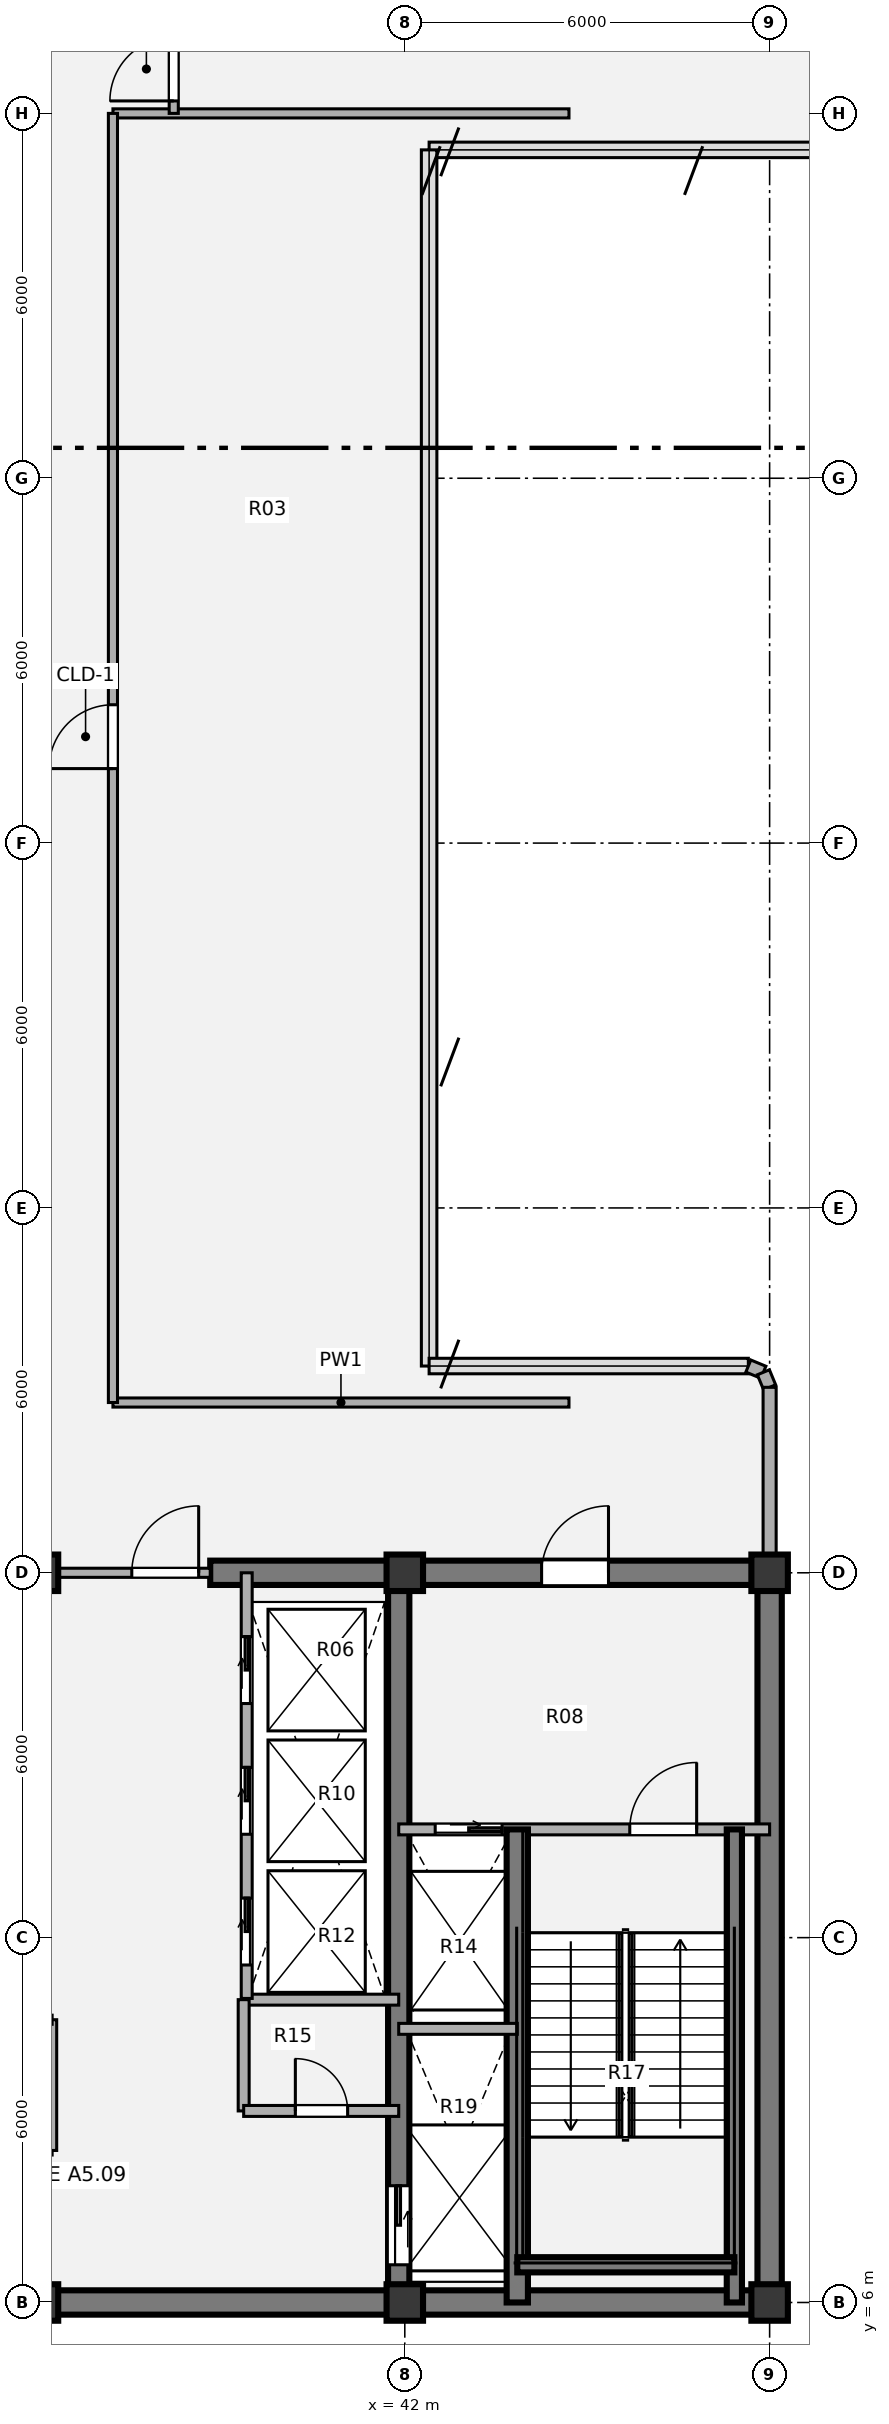
"""IFC4 building model, lengths in metres.
Left out: names, types, materials, properties, quantities, classifications, styles, units other than length and angle.
Written with IfcOpenShell. Run it as: python <this file> out.ifc"""

import sys

from ifc_helpers import new_model, si_unit, direction, frame, frame_2d, origin, origin_2d, place, context, subcontext, project, spatial, rectangle, extrude, source, transform, mapped, element, fill, save


model = new_model("IFC4")
c1 = context("Model", 3, precision=1e-05, world=origin(), true_north=direction((0.0, 1.0)))
c2 = subcontext(c1, "Body", "Model", "MODEL_VIEW")
j1 = project(units=[si_unit("LENGTHUNIT", "METRE"), si_unit("PLANEANGLEUNIT", "RADIAN")], contexts=[c1])
p1 = place(None, origin())
s1 = spatial("IfcSite", under=j1, at=p1, CompositionType="ELEMENT")
p2 = place(p1, origin())
s2 = spatial("IfcBuilding", under=s1, at=p2, CompositionType="ELEMENT")
p3 = place(p2, frame((0.0, 0.0, 291.06)))
s3 = spatial("IfcBuildingStorey", under=s2, at=p3, CompositionType="ELEMENT", Elevation=291.06)
m1 = source(origin(), c2, "Body", "SweptSolid", [
    extrude(rectangle(XDim=0.6, YDim=0.6, at=origin_2d()), origin(), (0.0, 0.0, 1.0), 4.86),
])
for number, where, z_axis, x_axis in (
    (1, (36.0, 6.0, 0.0), (0.0, 0.0, 1.0), (1.0, 0.0, 0.0)),
    (2, (42.0, 6.0, 0.0), (0.0, 0.0, 1.0), (1.0, 0.0, 0.0)),
    (3, (48.0, 6.0, 0.0), (0.0, 0.0, 1.0), (1.0, 0.0, 0.0)),
    (4, (36.0, 18.0, 0.0), (0.0, 0.0, 1.0), (1.0, 0.0, 0.0)),
    (5, (42.0, 18.0, 0.0), (0.0, 0.0, 1.0), (1.0, 0.0, 0.0)),
    (6, (48.0, 18.0, 0.0), (0.0, 0.0, 1.0), (1.0, 0.0, 0.0)),
):
    element("IfcColumn", number, at=place(p3, frame(where, z_axis=z_axis, x_axis=x_axis)), inside=s3, PredefinedType="COLUMN", context=c2, shape_type="MappedRepresentation", body=[
        mapped(m1, transform((0.0, 0.0, 0.0), x_axis=(1.0, 0.0, 0.0), y_axis=(0.0, 1.0, 0.0), z_axis=(0.0, 0.0, 1.0), scale=1.0)),
    ])
p4 = place(p3, frame((48.2, 6.0, 0.0), z_axis=(0.0, 0.0, 1.0), x_axis=(-1.0, 0.0, 0.0)))
e7 = element("IfcWall", 7, at=p4, inside=s3, PredefinedType="SHEAR", context=c2, shape_type="SweptSolid", body=[
    extrude(rectangle(XDim=24.4, YDim=0.4, at=frame_2d((12.2, 0.0))), origin(), (0.0, 0.0, 1.0), 4.86),
])
p5 = place(p3, frame((48.0, 18.0, 0.0), z_axis=(0.0, 0.0, 1.0), x_axis=(0.0, -1.0, 0.0)))
e8 = element("IfcWall", 8, at=p5, inside=s3, PredefinedType="SHEAR", context=c2, shape_type="SweptSolid", body=[
    extrude(rectangle(XDim=12.0, YDim=0.4, at=frame_2d((6.0, 0.0))), origin(), (0.0, 0.0, 1.0), 4.86),
])
p6 = place(p3, frame((38.8, 18.0, 0.0), z_axis=(0.0, 0.0, 1.0), x_axis=(1.0, 0.0, 0.0)))
e9 = element("IfcWall", 9, at=p6, inside=s3, PredefinedType="SHEAR", context=c2, shape_type="SweptSolid", body=[
    extrude(rectangle(XDim=9.4, YDim=0.4, at=frame_2d((4.7, 0.0))), origin(), (0.0, 0.0, 1.0), 4.86),
])
p7 = place(p6, frame((5.45, 0.0, 0.0)))
e10 = element("IfcOpeningElement", 10, at=p7, cuts=e9, PredefinedType="OPENING", context=c2, shape_type="SweptSolid", body=[
    extrude(rectangle(XDim=1.1, YDim=2.1, at=origin_2d()), frame((0.55, 0.21, 1.05), z_axis=(0.0, -1.0, 0.0), x_axis=(1.0, 0.0, 0.0)), (0.0, 0.0, 1.0), 0.42),
])
p8 = place(p3, frame((41.9, 18.0, 0.0), z_axis=(0.0, 0.0, 1.0), x_axis=(0.0, -1.0, 0.0)))
e11 = element("IfcWall", 11, at=p8, inside=s3, PredefinedType="SHEAR", context=c2, shape_type="SweptSolid", body=[
    extrude(rectangle(XDim=12.0, YDim=0.35, at=frame_2d((6.0, 0.0))), origin(), (0.0, 0.0, 1.0), 4.86),
])
p9 = place(p8, frame((10.08, 0.0, 0.0)))
e12 = element("IfcOpeningElement", 12, at=p9, cuts=e11, PredefinedType="OPENING", context=c2, shape_type="SweptSolid", body=[
    extrude(rectangle(XDim=1.3, YDim=2.1, at=origin_2d()), frame((0.65, 0.185, 1.05), z_axis=(0.0, -1.0, 0.0), x_axis=(1.0, 0.0, 0.0)), (0.0, 0.0, 1.0), 0.37),
])
p10 = place(p3, frame((47.65, 21.4, 0.0), z_axis=(0.0, 0.0, 1.0), x_axis=(0.924205486139, -0.381895560841, 0.0)))
e13 = element("IfcWall", 13, at=p10, inside=s3, PredefinedType="SOLIDWALL", context=c2, shape_type="SweptSolid", body=[
    extrude(rectangle(XDim=0.268, YDim=0.215, at=frame_2d((0.134, 0.0))), origin(), (0.0, 0.0, 1.0), 4.61),
])
p11 = place(p3, frame((47.897, 21.298, 0.0), z_axis=(0.0, 0.0, 1.0), x_axis=(0.382673670509, -0.923883575944, 0.0)))
e14 = element("IfcWall", 14, at=p11, inside=s3, PredefinedType="SOLIDWALL", context=c2, shape_type="SweptSolid", body=[
    extrude(rectangle(XDim=0.268, YDim=0.215, at=frame_2d((0.134, 0.0))), origin(), (0.0, 0.0, 1.0), 4.61),
])
p12 = place(p3, frame((48.0, 21.05, 0.0), z_axis=(0.0, 0.0, 1.0), x_axis=(0.0, -1.0, 0.0)))
e15 = element("IfcWall", 15, at=p12, inside=s3, PredefinedType="SOLIDWALL", context=c2, shape_type="SweptSolid", body=[
    extrude(rectangle(XDim=2.77, YDim=0.215, at=frame_2d((1.385, 0.0))), origin(), (0.0, 0.0, 1.0), 2.798),
])
p13 = place(p3, frame((36.2, 8.5, 0.0), z_axis=(0.0, 0.0, 1.0), x_axis=(0.0, 1.0, 0.0)))
e16 = element("IfcWall", 16, at=p13, inside=s3, PredefinedType="PARTITIONING", context=c2, shape_type="SweptSolid", body=[
    extrude(rectangle(XDim=2.15, YDim=0.15, at=frame_2d((1.075, 0.0))), origin(), (0.0, 0.0, 1.0), 3.795),
])
p14 = place(p3, frame((39.35, 10.98, 0.0), z_axis=(0.0, 0.0, 1.0), x_axis=(1.0, 0.0, 0.0)))
e17 = element("IfcWall", 17, at=p14, inside=s3, PredefinedType="PARTITIONING", context=c2, shape_type="SweptSolid", body=[
    extrude(rectangle(XDim=2.55, YDim=0.18, at=frame_2d((1.275, 0.0))), origin(), (0.0, 0.0, 1.0), 4.58),
])
p15 = place(p3, frame((39.35, 9.15, 0.0), z_axis=(0.0, 0.0, 1.0), x_axis=(0.0, 1.0, 0.0)))
e18 = element("IfcWall", 18, at=p15, inside=s3, PredefinedType="PARTITIONING", context=c2, shape_type="SweptSolid", body=[
    extrude(rectangle(XDim=1.83, YDim=0.18, at=frame_2d((0.915, 0.0))), origin(), (0.0, 0.0, 1.0), 4.58),
])
p16 = place(p3, frame((39.35, 9.15, 0.0), z_axis=(0.0, 0.0, 1.0), x_axis=(1.0, 0.0, 0.0)))
e19 = element("IfcWall", 19, at=p16, inside=s3, PredefinedType="PARTITIONING", context=c2, shape_type="SweptSolid", body=[
    extrude(rectangle(XDim=2.55, YDim=0.18, at=frame_2d((1.275, 0.0))), origin(), (0.0, 0.0, 1.0), 4.58),
])
p17 = place(p16, frame((0.85, 0.0, 0.0)))
e20 = element("IfcOpeningElement", 20, at=p17, cuts=e19, PredefinedType="OPENING", context=c2, shape_type="SweptSolid", body=[
    extrude(rectangle(XDim=0.86, YDim=2.1, at=origin_2d()), frame((0.43, 0.1, 1.05), z_axis=(0.0, -1.0, 0.0), x_axis=(1.0, 0.0, 0.0)), (0.0, 0.0, 1.0), 0.2),
])
p18 = place(p3, frame((33.2, 18.0, 0.0), z_axis=(0.0, 0.0, 1.0), x_axis=(1.0, 0.0, 0.0)))
e21 = element("IfcWall", 21, at=p18, inside=s3, PredefinedType="PARTITIONING", context=c2, shape_type="SweptSolid", body=[
    extrude(rectangle(XDim=5.6, YDim=0.15, at=frame_2d((2.8, 0.0))), origin(), (0.0, 0.0, 1.0), 3.595),
])
p19 = place(p18, frame((0.19, 0.0, 0.0)))
e22 = element("IfcOpeningElement", 22, at=p19, cuts=e21, PredefinedType="OPENING", context=c2, shape_type="SweptSolid", body=[
    extrude(rectangle(XDim=1.1, YDim=2.1, at=origin_2d()), frame((0.55, 0.085, 1.05), z_axis=(0.0, -1.0, 0.0), x_axis=(1.0, 0.0, 0.0)), (0.0, 0.0, 1.0), 0.17),
])
p20 = place(p18, frame((4.31, 0.0, 0.0)))
e23 = element("IfcOpeningElement", 23, at=p20, cuts=e21, PredefinedType="OPENING", context=c2, shape_type="SweptSolid", body=[
    extrude(rectangle(XDim=1.1, YDim=2.1, at=origin_2d()), frame((0.55, 0.085, 1.05), z_axis=(0.0, -1.0, 0.0), x_axis=(1.0, 0.0, 0.0)), (0.0, 0.0, 1.0), 0.17),
])
p21 = place(p3, frame((41.9, 13.78, 0.0), z_axis=(0.0, 0.0, 1.0), x_axis=(1.0, 0.0, 0.0)))
e24 = element("IfcWall", 24, at=p21, inside=s3, PredefinedType="PARTITIONING", context=c2, shape_type="SweptSolid", body=[
    extrude(rectangle(XDim=6.1, YDim=0.18, at=frame_2d((3.05, 0.0))), origin(), (0.0, 0.0, 1.0), 4.58),
])
p22 = place(p21, frame((0.6, 0.0, 0.0)))
e25 = element("IfcOpeningElement", 25, at=p22, cuts=e24, PredefinedType="OPENING", context=c2, shape_type="SweptSolid", body=[
    extrude(rectangle(XDim=1.1, YDim=2.1, at=origin_2d()), frame((0.55, 0.1, 1.05), z_axis=(0.0, -1.0, 0.0), x_axis=(1.0, 0.0, 0.0)), (0.0, 0.0, 1.0), 0.2),
])
p23 = place(p21, frame((3.8, 0.0, 0.0)))
e26 = element("IfcOpeningElement", 26, at=p23, cuts=e24, PredefinedType="OPENING", context=c2, shape_type="SweptSolid", body=[
    extrude(rectangle(XDim=1.1, YDim=2.1, at=origin_2d()), frame((0.55, 0.1, 1.05), z_axis=(0.0, -1.0, 0.0), x_axis=(1.0, 0.0, 0.0)), (0.0, 0.0, 1.0), 0.2),
])
p24 = place(p3, frame((43.85, 6.0, 0.0), z_axis=(0.0, 0.0, 1.0), x_axis=(0.0, 1.0, 0.0)))
e27 = element("IfcWall", 27, at=p24, inside=s3, PredefinedType="SHEAR", context=c2, shape_type="SweptSolid", body=[
    extrude(rectangle(XDim=7.78, YDim=0.35, at=frame_2d((3.89, 0.0))), origin(), (0.0, 0.0, 1.0), 4.93),
])
p25 = place(p3, frame((47.42, 6.0, 0.0), z_axis=(0.0, 0.0, 1.0), x_axis=(0.0, 1.0, 0.0)))
e28 = element("IfcWall", 28, at=p25, inside=s3, PredefinedType="SHEAR", context=c2, shape_type="SweptSolid", body=[
    extrude(rectangle(XDim=7.78, YDim=0.25, at=frame_2d((3.89, 0.0))), origin(), (0.0, 0.0, 1.0), 4.93),
])
p26 = place(p3, frame((43.85, 6.62, 0.0), z_axis=(0.0, 0.0, 1.0), x_axis=(1.0, 0.0, 0.0)))
e29 = element("IfcWall", 29, at=p26, inside=s3, PredefinedType="SHEAR", context=c2, shape_type="SweptSolid", body=[
    extrude(rectangle(XDim=3.57, YDim=0.25, at=frame_2d((1.785, 0.0))), origin(), (0.0, 0.0, 1.0), 4.93),
])
p27 = place(p3, frame((41.9, 10.5, 0.0), z_axis=(0.0, 0.0, 1.0), x_axis=(1.0, 0.0, 0.0)))
e30 = element("IfcWall", 30, at=p27, inside=s3, PredefinedType="PARTITIONING", context=c2, shape_type="SweptSolid", body=[
    extrude(rectangle(XDim=1.95, YDim=0.18, at=frame_2d((0.975, 0.0))), origin(), (0.0, 0.0, 1.0), 4.58),
])
p28 = place(p3, frame((39.4, 11.0, 0.0), z_axis=(0.0, 0.0, 1.0), x_axis=(0.0, 1.0, 0.0)))
e31 = element("IfcWall", 31, at=p28, inside=s3, PredefinedType="PARTITIONING", context=c2, shape_type="SweptSolid", body=[
    extrude(rectangle(XDim=7.0, YDim=0.18, at=frame_2d((3.5, 0.0))), origin(), (0.0, 0.0, 1.0), 4.58),
])
p29 = place(p28, frame((0.55, 0.0, 0.0)))
e32 = element("IfcOpeningElement", 32, at=p29, cuts=e31, PredefinedType="OPENING", context=c2, shape_type="SweptSolid", body=[
    extrude(rectangle(XDim=1.1, YDim=2.1, at=origin_2d()), frame((0.55, 0.1, 1.05), z_axis=(0.0, -1.0, 0.0), x_axis=(1.0, 0.0, 0.0)), (0.0, 0.0, 1.0), 0.2),
])
p30 = place(p28, frame((2.7, 0.0, 0.0)))
e33 = element("IfcOpeningElement", 33, at=p30, cuts=e31, PredefinedType="OPENING", context=c2, shape_type="SweptSolid", body=[
    extrude(rectangle(XDim=1.1, YDim=2.1, at=origin_2d()), frame((0.55, 0.1, 1.05), z_axis=(0.0, -1.0, 0.0), x_axis=(1.0, 0.0, 0.0)), (0.0, 0.0, 1.0), 0.2),
])
p31 = place(p28, frame((4.85, 0.0, 0.0)))
e34 = element("IfcOpeningElement", 34, at=p31, cuts=e31, PredefinedType="OPENING", context=c2, shape_type="SweptSolid", body=[
    extrude(rectangle(XDim=1.1, YDim=2.1, at=origin_2d()), frame((0.55, 0.1, 1.05), z_axis=(0.0, -1.0, 0.0), x_axis=(1.0, 0.0, 0.0)), (0.0, 0.0, 1.0), 0.2),
])
for number, where, z_axis, x_axis in (
    (35, (37.2, 20.8, 0.0), (0.0, 0.0, 1.0), (1.0, 0.0, 0.0)),
    (36, (37.2, 42.0, 0.0), (0.0, 0.0, 1.0), (1.0, 0.0, 0.0)),
):
    element("IfcWall", number, at=place(p3, frame(where, z_axis=z_axis, x_axis=x_axis)), inside=s3, PredefinedType="PARTITIONING", context=c2, shape_type="SweptSolid", body=[
        extrude(rectangle(XDim=7.5, YDim=0.15, at=frame_2d((3.75, 0.0))), origin(), (0.0, 0.0, 1.0), 4.58),
    ])
p32 = place(p3, frame((37.2, 20.8, 0.0), z_axis=(0.0, 0.0, 1.0), x_axis=(0.0, 1.0, 0.0)))
e37 = element("IfcWall", 37, at=p32, inside=s3, PredefinedType="PARTITIONING", context=c2, shape_type="SweptSolid", body=[
    extrude(rectangle(XDim=21.2, YDim=0.15, at=frame_2d((10.6, 0.0))), origin(), (0.0, 0.0, 1.0), 4.58),
])
p33 = place(p32, frame((10.425, 0.0, 0.0)))
e38 = element("IfcOpeningElement", 38, at=p33, cuts=e37, PredefinedType="OPENING", context=c2, shape_type="SweptSolid", body=[
    extrude(rectangle(XDim=1.05, YDim=2.1, at=origin_2d()), frame((0.525, 0.085, 1.05), z_axis=(0.0, -1.0, 0.0), x_axis=(1.0, 0.0, 0.0)), (0.0, 0.0, 1.0), 0.17),
])
p34 = place(p3, frame((38.2, 42.0, 0.0), z_axis=(0.0, 0.0, 1.0), x_axis=(0.0, 1.0, 0.0)))
e39 = element("IfcWall", 39, at=p34, inside=s3, PredefinedType="PARTITIONING", context=c2, shape_type="SweptSolid", body=[
    extrude(rectangle(XDim=7.6, YDim=0.15, at=frame_2d((3.8, 0.0))), origin(), (0.0, 0.0, 1.0), 4.58),
])
p35 = place(p34, frame((0.205, 0.0, 0.0)))
e40 = element("IfcOpeningElement", 40, at=p35, cuts=e39, PredefinedType="OPENING", context=c2, shape_type="SweptSolid", body=[
    extrude(rectangle(XDim=1.05, YDim=2.1, at=origin_2d()), frame((0.525, 0.085, 1.05), z_axis=(0.0, -1.0, 0.0), x_axis=(1.0, 0.0, 0.0)), (0.0, 0.0, 1.0), 0.17),
])
m2 = source(origin(), c2, "Body", "SweptSolid", [
    extrude(rectangle(XDim=0.86, YDim=2.1, at=origin_2d()), frame((0.43, 0.025, 1.05), z_axis=(0.0, -1.0, 0.0), x_axis=(1.0, 0.0, 0.0)), (0.0, 0.0, 1.0), 0.05),
])
p36 = place(p17, origin())
e41 = element("IfcDoor", 41, at=p36, inside=s3, OperationType="SINGLE_SWING_LEFT", PredefinedType="DOOR", context=c2, shape_type="MappedRepresentation", body=[
    mapped(m2, transform((0.0, 0.0, 0.0), x_axis=(1.0, 0.0, 0.0), y_axis=(0.0, 1.0, 0.0), z_axis=(0.0, 0.0, 1.0), scale=1.0)),
])
fill(e20, e41)
m3 = source(origin(), c2, "Body", "SweptSolid", [
    extrude(rectangle(XDim=1.1, YDim=2.1, at=origin_2d()), frame((0.55, 0.025, 1.05), z_axis=(0.0, -1.0, 0.0), x_axis=(1.0, 0.0, 0.0)), (0.0, 0.0, 1.0), 0.05),
])
p37 = place(p20, origin())
e42 = element("IfcDoor", 42, at=p37, inside=s3, OperationType="SINGLE_SWING_RIGHT", PredefinedType="DOOR", context=c2, shape_type="MappedRepresentation", body=[
    mapped(m3, transform((0.0, 0.0, 0.0), x_axis=(1.0, 0.0, 0.0), y_axis=(0.0, 1.0, 0.0), z_axis=(0.0, 0.0, 1.0), scale=1.0)),
])
fill(e23, e42)
m4 = source(origin(), c2, "Body", "SweptSolid", [
    extrude(rectangle(XDim=1.1, YDim=2.1, at=origin_2d()), frame((0.55, 0.025, 1.05), z_axis=(0.0, -1.0, 0.0), x_axis=(1.0, 0.0, 0.0)), (0.0, 0.0, 1.0), 0.05),
])
p38 = place(p22, origin())
e43 = element("IfcDoor", 43, at=p38, inside=s3, OperationType="SLIDING_TO_RIGHT", PredefinedType="DOOR", context=c2, shape_type="MappedRepresentation", body=[
    mapped(m4, transform((0.0, 0.0, 0.0), x_axis=(1.0, 0.0, 0.0), y_axis=(0.0, 1.0, 0.0), z_axis=(0.0, 0.0, 1.0), scale=1.0)),
])
fill(e25, e43)
m5 = source(origin(), c2, "Body", "SweptSolid", [
    extrude(rectangle(XDim=1.1, YDim=2.1, at=origin_2d()), frame((0.55, 0.025, 1.05), z_axis=(0.0, -1.0, 0.0), x_axis=(1.0, 0.0, 0.0)), (0.0, 0.0, 1.0), 0.05),
])
p39 = place(p23, origin())
e44 = element("IfcDoor", 44, at=p39, inside=s3, OperationType="SINGLE_SWING_RIGHT", PredefinedType="DOOR", context=c2, shape_type="MappedRepresentation", body=[
    mapped(m5, transform((0.0, 0.0, 0.0), x_axis=(1.0, 0.0, 0.0), y_axis=(0.0, 1.0, 0.0), z_axis=(0.0, 0.0, 1.0), scale=1.0)),
])
fill(e26, e44)
m6 = source(origin(), c2, "Body", "SweptSolid", [
    extrude(rectangle(XDim=1.3, YDim=2.1, at=origin_2d()), frame((0.65, 0.025, 1.05), z_axis=(0.0, -1.0, 0.0), x_axis=(1.0, 0.0, 0.0)), (0.0, 0.0, 1.0), 0.05),
])
p40 = place(p9, origin())
e45 = element("IfcDoor", 45, at=p40, inside=s3, OperationType="SLIDING_TO_LEFT", PredefinedType="DOOR", context=c2, shape_type="MappedRepresentation", body=[
    mapped(m6, transform((0.0, 0.0, 0.0), x_axis=(1.0, 0.0, 0.0), y_axis=(0.0, 1.0, 0.0), z_axis=(0.0, 0.0, 1.0), scale=1.0)),
])
fill(e12, e45)
p41 = place(p7, origin())
e46 = element("IfcDoor", 46, at=p41, inside=s3, OperationType="SINGLE_SWING_RIGHT", PredefinedType="DOOR", context=c2, shape_type="MappedRepresentation", body=[
    mapped(m3, transform((0.0, 0.0, 0.0), x_axis=(1.0, 0.0, 0.0), y_axis=(0.0, 1.0, 0.0), z_axis=(0.0, 0.0, 1.0), scale=1.0)),
])
fill(e10, e46)
p42 = place(p29, origin())
e47 = element("IfcDoor", 47, at=p42, inside=s3, OperationType="SLIDING_TO_RIGHT", PredefinedType="DOOR", context=c2, shape_type="MappedRepresentation", body=[
    mapped(m4, transform((0.0, 0.0, 0.0), x_axis=(1.0, 0.0, 0.0), y_axis=(0.0, 1.0, 0.0), z_axis=(0.0, 0.0, 1.0), scale=1.0)),
])
fill(e32, e47)
p43 = place(p30, origin())
e48 = element("IfcDoor", 48, at=p43, inside=s3, OperationType="SLIDING_TO_RIGHT", PredefinedType="DOOR", context=c2, shape_type="MappedRepresentation", body=[
    mapped(m4, transform((0.0, 0.0, 0.0), x_axis=(1.0, 0.0, 0.0), y_axis=(0.0, 1.0, 0.0), z_axis=(0.0, 0.0, 1.0), scale=1.0)),
])
fill(e33, e48)
p44 = place(p31, origin())
e49 = element("IfcDoor", 49, at=p44, inside=s3, OperationType="SLIDING_TO_RIGHT", PredefinedType="DOOR", context=c2, shape_type="MappedRepresentation", body=[
    mapped(m4, transform((0.0, 0.0, 0.0), x_axis=(1.0, 0.0, 0.0), y_axis=(0.0, 1.0, 0.0), z_axis=(0.0, 0.0, 1.0), scale=1.0)),
])
fill(e34, e49)
m7 = source(origin(), c2, "Body", "SweptSolid", [
    extrude(rectangle(XDim=1.05, YDim=2.1, at=origin_2d()), frame((0.525, 0.025, 1.05), z_axis=(0.0, -1.0, 0.0), x_axis=(1.0, 0.0, 0.0)), (0.0, 0.0, 1.0), 0.05),
])
p45 = place(p33, origin())
e50 = element("IfcDoor", 50, at=p45, inside=s3, OperationType="SINGLE_SWING_LEFT", PredefinedType="DOOR", context=c2, shape_type="MappedRepresentation", body=[
    mapped(m7, transform((0.0, 0.0, 0.0), x_axis=(1.0, 0.0, 0.0), y_axis=(0.0, 1.0, 0.0), z_axis=(0.0, 0.0, 1.0), scale=1.0)),
])
fill(e38, e50)
p46 = place(p35, origin())
e51 = element("IfcDoor", 51, at=p46, inside=s3, OperationType="SINGLE_SWING_LEFT", PredefinedType="DOOR", context=c2, shape_type="MappedRepresentation", body=[
    mapped(m7, transform((0.0, 0.0, 0.0), x_axis=(1.0, 0.0, 0.0), y_axis=(0.0, 1.0, 0.0), z_axis=(0.0, 0.0, 1.0), scale=1.0)),
])
fill(e40, e51)
save(model, sys.argv[1])
